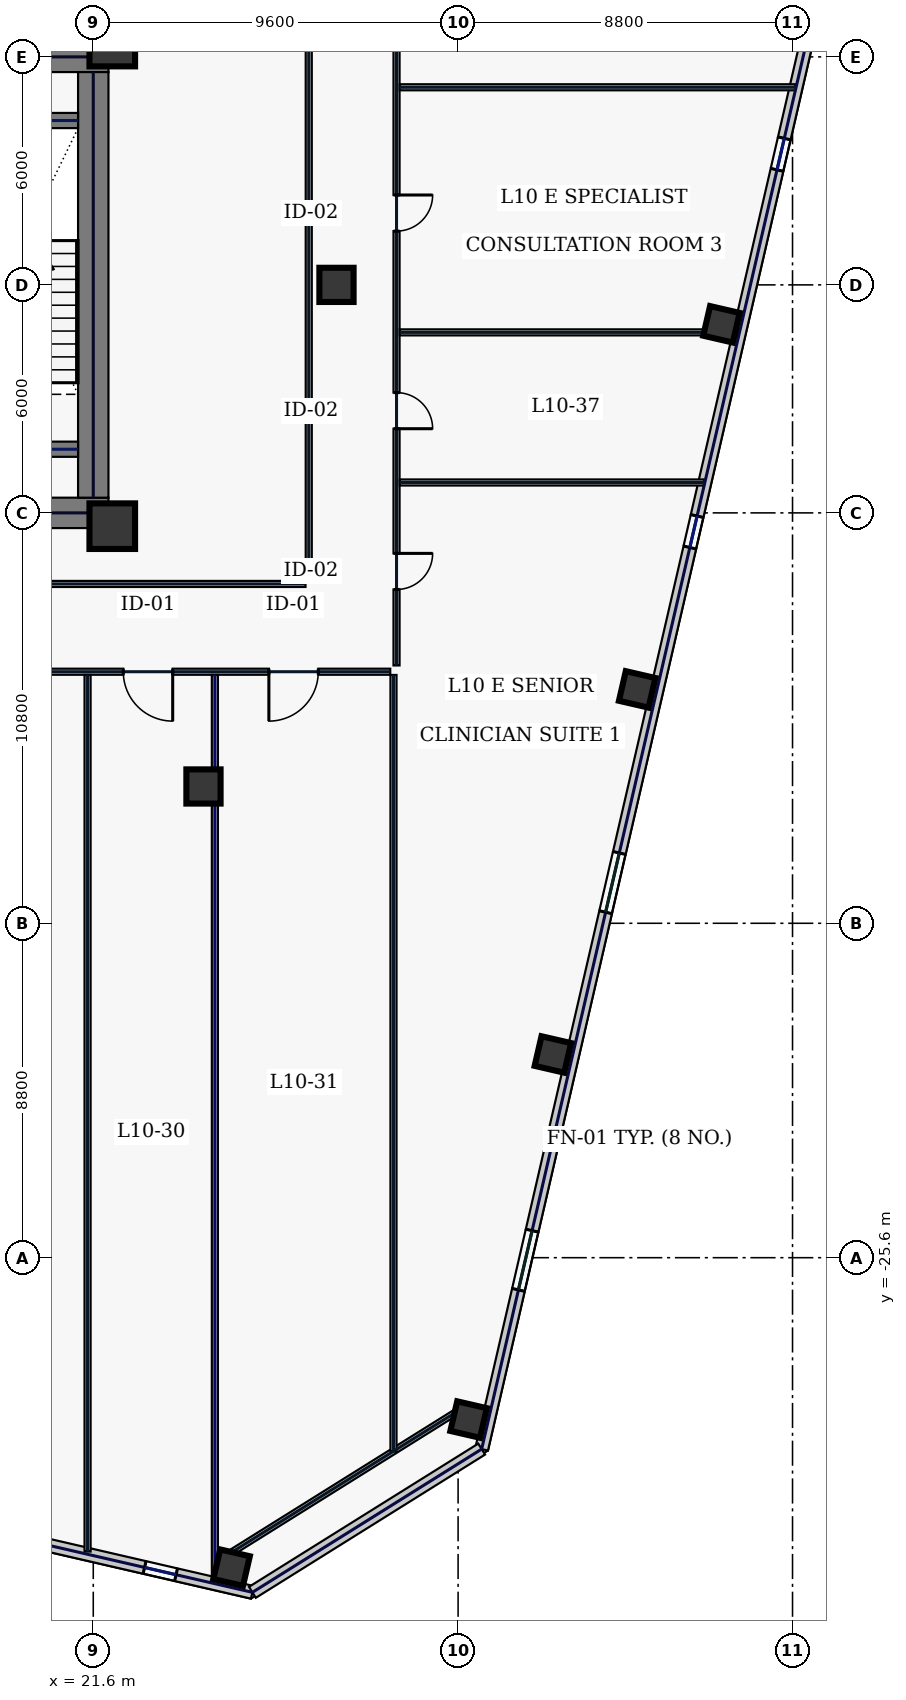
"""IFC4 building model, lengths in metres.
Left out: names, types, materials, properties, quantities, classifications, styles, units other than length and angle.
Written with IfcOpenShell. Run it as: python <this file> out.ifc"""

import sys

from ifc_helpers import new_model, si_unit, direction, frame, frame_2d, origin, origin_2d, place, context, subcontext, project, spatial, rectangle, hollow_rectangle, extrude, element, fill, save


model = new_model("IFC4")
c1 = context("Model", 3, precision=1e-05, world=origin(), true_north=direction((0.0, 1.0)))
c2 = subcontext(c1, "Body", "Model", "MODEL_VIEW")
j1 = project(units=[si_unit("LENGTHUNIT", "METRE"), si_unit("PLANEANGLEUNIT", "RADIAN")], contexts=[c1])
p1 = place(None, origin())
s1 = spatial("IfcSite", under=j1, at=p1, CompositionType="ELEMENT")
p2 = place(p1, origin())
s2 = spatial("IfcBuilding", under=s1, at=p2, CompositionType="ELEMENT")
p3 = place(p2, frame((0.0, 0.0, 51.4)))
s3 = spatial("IfcBuildingStorey", under=s2, at=p3, CompositionType="ELEMENT", Elevation=51.4)
for number, where, z_axis, x_axis in (
    (1, (10.4, 6.0, 0.0), (0.0, 0.0, 1.0), (1.0, 0.0, 0.0)),
    (2, (10.4, -6.0, 0.0), (0.0, 0.0, 1.0), (1.0, 0.0, 0.0)),
):
    element("IfcWall", number, at=place(p3, frame(where, z_axis=z_axis, x_axis=x_axis)), inside=s3, PredefinedType="SHEAR", context=c2, shape_type="SweptSolid", body=[
        extrude(rectangle(XDim=11.6, YDim=0.8, at=frame_2d((5.8, 0.0))), origin(), (0.0, 0.0, 1.0), 3.74),
    ])
p4 = place(p3, frame((21.6, -5.6, 0.0), z_axis=(0.0, 0.0, 1.0), x_axis=(0.0, 1.0, 0.0)))
e3 = element("IfcWall", 3, at=p4, inside=s3, PredefinedType="SHEAR", context=c2, shape_type="SweptSolid", body=[
    extrude(rectangle(XDim=11.2, YDim=0.8, at=frame_2d((5.6, 0.0))), origin(), (0.0, 0.0, 1.0), 3.74),
])
for number, where, z_axis, x_axis in (
    (4, (17.8, -4.325, 0.0), (0.0, 0.0, 1.0), (1.0, 0.0, 0.0)),
    (5, (17.8, 4.325, 0.0), (0.0, 0.0, 1.0), (1.0, 0.0, 0.0)),
):
    element("IfcWall", number, at=place(p3, frame(where, z_axis=z_axis, x_axis=x_axis)), inside=s3, PredefinedType="SHEAR", context=c2, shape_type="SweptSolid", body=[
        extrude(rectangle(XDim=3.4, YDim=0.4, at=frame_2d((1.7, 0.0))), origin(), (0.0, 0.0, 1.0), 3.74),
    ])
for number, where, z_axis, x_axis in (
    (6, (22.1, -6.35, 0.0), (0.0, 0.0, 1.0), (1.0, 0.0, 0.0)),
    (7, (22.1, 6.35, 0.0), (0.0, 0.0, 1.0), (1.0, 0.0, 0.0)),
):
    element("IfcColumn", number, at=place(p3, frame(where, z_axis=z_axis, x_axis=x_axis)), inside=s3, PredefinedType="COLUMN", context=c2, shape_type="SweptSolid", body=[
        extrude(hollow_rectangle(XDim=1.2, YDim=1.2, WallThickness=0.05, at=origin_2d()), origin(), (0.0, 0.0, 1.0), 3.74),
    ])
for number, where, z_axis, x_axis in (
    (8, (24.5, -13.2, 0.0), (0.0, 0.0, 1.0), (1.0, 0.0, 0.0)),
    (9, (28.0, 0.0, 0.0), (0.0, 0.0, 1.0), (1.0, 0.0, 0.0)),
):
    element("IfcColumn", number, at=place(p3, frame(where, z_axis=z_axis, x_axis=x_axis)), inside=s3, PredefinedType="COLUMN", context=c2, shape_type="SweptSolid", body=[
        extrude(hollow_rectangle(XDim=0.9, YDim=0.9, WallThickness=0.04, at=origin_2d()), origin(), (0.0, 0.0, 1.0), 3.74),
    ])
for number, where, z_axis, x_axis in (
    (10, (25.24, -33.757, 0.0), (0.0, 0.0, 1.0), (0.974, -0.225, 0.0)),
    (11, (31.476, -29.86, 0.0), (0.0, 0.0, 1.0), (0.974, -0.225, 0.0)),
    (12, (33.694, -20.252, 0.0), (0.0, 0.0, 1.0), (0.974, -0.225, 0.0)),
    (13, (35.912, -10.645, 0.0), (0.0, 0.0, 1.0), (0.974, -0.225, 0.0)),
    (14, (38.13, -1.038, 0.0), (0.0, 0.0, 1.0), (0.974, -0.225, 0.0)),
):
    element("IfcColumn", number, at=place(p3, frame(where, z_axis=z_axis, x_axis=x_axis)), inside=s3, PredefinedType="COLUMN", context=c2, shape_type="SweptSolid", body=[
        extrude(hollow_rectangle(XDim=0.8, YDim=0.8, WallThickness=0.036, at=origin_2d()), origin(), (0.0, 0.0, 1.0), 3.74),
    ])
p5 = place(p3, frame((3.717, -29.311, 0.0), z_axis=(0.0, 0.0, 1.0), x_axis=(0.97436993772, -0.224951604723, 0.0)))
e15 = element("IfcWall", 15, at=p5, inside=s3, PredefinedType="STANDARD", context=c2, shape_type="SweptSolid", body=[
    extrude(rectangle(XDim=22.651, YDim=0.34, at=frame_2d((11.326, 0.0))), origin(), (0.0, 0.0, 1.0), 3.74),
])
p6 = place(p5, frame((3.856, 0.0, 0.72)))
e16 = element("IfcOpeningElement", 16, at=p6, cuts=e15, PredefinedType="OPENING", context=c2, shape_type="SweptSolid", body=[
    extrude(rectangle(XDim=2.5, YDim=2.15, at=frame_2d((1.25, 1.075))), frame((0.0, 0.18, 0.0), z_axis=(0.0, -1.0, 0.0), x_axis=(1.0, 0.0, 0.0)), (0.0, 0.0, 1.0), 0.36),
])
p7 = place(p5, frame((9.991, 0.0, 0.72)))
e17 = element("IfcOpeningElement", 17, at=p7, cuts=e15, PredefinedType="OPENING", context=c2, shape_type="SweptSolid", body=[
    extrude(rectangle(XDim=0.85, YDim=1.85, at=frame_2d((0.425, 0.925))), frame((0.0, 0.18, 0.0), z_axis=(0.0, -1.0, 0.0), x_axis=(1.0, 0.0, 0.0)), (0.0, 0.0, 1.0), 0.36),
])
p8 = place(p5, frame((15.255, 0.0, 0.72)))
e18 = element("IfcOpeningElement", 18, at=p8, cuts=e15, PredefinedType="OPENING", context=c2, shape_type="SweptSolid", body=[
    extrude(rectangle(XDim=0.85, YDim=1.85, at=frame_2d((0.425, 0.925))), frame((0.0, 0.18, 0.0), z_axis=(0.0, -1.0, 0.0), x_axis=(1.0, 0.0, 0.0)), (0.0, 0.0, 1.0), 0.36),
])
p9 = place(p5, frame((19.739, 0.0, 0.72)))
e19 = element("IfcOpeningElement", 19, at=p9, cuts=e15, PredefinedType="OPENING", context=c2, shape_type="SweptSolid", body=[
    extrude(rectangle(XDim=0.85, YDim=1.85, at=frame_2d((0.425, 0.925))), frame((0.0, 0.18, 0.0), z_axis=(0.0, -1.0, 0.0), x_axis=(1.0, 0.0, 0.0)), (0.0, 0.0, 1.0), 0.36),
])
p10 = place(p3, frame((31.82, -30.637, 0.0), z_axis=(0.0, 0.0, 1.0), x_axis=(0.224949969076, 0.974370315338, 0.0)))
e20 = element("IfcWall", 20, at=p10, inside=s3, PredefinedType="STANDARD", context=c2, shape_type="SweptSolid", body=[
    extrude(rectangle(XDim=40.8, YDim=0.34, at=frame_2d((20.4, 0.0))), origin(), (0.0, 0.0, 1.0), 3.74),
])
p11 = place(p10, frame((4.3, 0.0, 0.58)))
e21 = element("IfcOpeningElement", 21, at=p11, cuts=e20, PredefinedType="OPENING", context=c2, shape_type="SweptSolid", body=[
    extrude(rectangle(XDim=1.6, YDim=2.3, at=frame_2d((0.8, 1.15))), frame((0.0, 0.18, 0.0), z_axis=(0.0, -1.0, 0.0), x_axis=(1.0, 0.0, 0.0)), (0.0, 0.0, 1.0), 0.36),
])
p12 = place(p10, frame((14.5, 0.0, 0.58)))
e22 = element("IfcOpeningElement", 22, at=p12, cuts=e20, PredefinedType="OPENING", context=c2, shape_type="SweptSolid", body=[
    extrude(rectangle(XDim=1.6, YDim=2.3, at=frame_2d((0.8, 1.15))), frame((0.0, 0.18, 0.0), z_axis=(0.0, -1.0, 0.0), x_axis=(1.0, 0.0, 0.0)), (0.0, 0.0, 1.0), 0.36),
])
p13 = place(p10, frame((24.35, 0.0, 0.75)))
e23 = element("IfcOpeningElement", 23, at=p13, cuts=e20, PredefinedType="OPENING", context=c2, shape_type="SweptSolid", body=[
    extrude(rectangle(XDim=0.85, YDim=1.85, at=frame_2d((0.425, 0.925))), frame((0.0, 0.18, 0.0), z_axis=(0.0, -1.0, 0.0), x_axis=(1.0, 0.0, 0.0)), (0.0, 0.0, 1.0), 0.36),
])
p14 = place(p10, frame((34.55, 0.0, 0.75)))
e24 = element("IfcOpeningElement", 24, at=p14, cuts=e20, PredefinedType="OPENING", context=c2, shape_type="SweptSolid", body=[
    extrude(rectangle(XDim=0.85, YDim=1.85, at=frame_2d((0.425, 0.925))), frame((0.0, 0.18, 0.0), z_axis=(0.0, -1.0, 0.0), x_axis=(1.0, 0.0, 0.0)), (0.0, 0.0, 1.0), 0.36),
])
p15 = place(p3, frame((25.788, -34.406, 0.0), z_axis=(0.0, 0.0, 1.0), x_axis=(0.848046504656, 0.529921811158, 0.0)))
e25 = element("IfcWall", 25, at=p15, inside=s3, PredefinedType="STANDARD", context=c2, shape_type="SweptSolid", body=[
    extrude(rectangle(XDim=7.113, YDim=0.34, at=frame_2d((3.557, 0.0))), origin(), (0.0, 0.0, 1.0), 3.74),
])
p16 = place(p3, frame((25.06, -33.468, 0.0), z_axis=(0.0, 0.0, 1.0), x_axis=(0.848043064089, 0.529927317139, 0.0)))
e26 = element("IfcWall", 26, at=p16, inside=s3, PredefinedType="PARTITIONING", context=c2, shape_type="SweptSolid", body=[
    extrude(rectangle(XDim=7.354, YDim=0.16, at=frame_2d((3.677, 0.0))), origin(), (0.0, 0.0, 1.0), 3.74),
])
p17 = place(p3, frame((29.58, 10.115, 0.0), z_axis=(0.0, 0.0, 1.0), x_axis=(0.0, -1.0, 0.0)))
e27 = element("IfcWall", 27, at=p17, inside=s3, PredefinedType="PARTITIONING", context=c2, shape_type="SweptSolid", body=[
    extrude(rectangle(XDim=20.13, YDim=0.16, at=frame_2d((10.065, 0.0))), origin(), (0.0, 0.0, 1.0), 3.74),
])
p18 = place(p17, frame((17.181, 0.0, 0.0)))
e28 = element("IfcOpeningElement", 28, at=p18, cuts=e27, PredefinedType="OPENING", context=c2, shape_type="SweptSolid", body=[
    extrude(rectangle(XDim=0.95, YDim=2.2, at=frame_2d((0.475, 1.1))), frame((0.0, 0.09, 0.0), z_axis=(0.0, -1.0, 0.0), x_axis=(1.0, 0.0, 0.0)), (0.0, 0.0, 1.0), 0.18),
])
p19 = place(p17, frame((12.95, 0.0, 0.0)))
e29 = element("IfcOpeningElement", 29, at=p19, cuts=e27, PredefinedType="OPENING", context=c2, shape_type="SweptSolid", body=[
    extrude(rectangle(XDim=0.95, YDim=2.2, at=frame_2d((0.475, 1.1))), frame((0.0, 0.09, 0.0), z_axis=(0.0, -1.0, 0.0), x_axis=(1.0, 0.0, 0.0)), (0.0, 0.0, 1.0), 0.18),
])
p20 = place(p17, frame((7.75, 0.0, 0.0)))
e30 = element("IfcOpeningElement", 30, at=p20, cuts=e27, PredefinedType="OPENING", context=c2, shape_type="SweptSolid", body=[
    extrude(rectangle(XDim=0.95, YDim=2.2, at=frame_2d((0.475, 1.1))), frame((0.0, 0.09, 0.0), z_axis=(0.0, -1.0, 0.0), x_axis=(1.0, 0.0, 0.0)), (0.0, 0.0, 1.0), 0.18),
])
p21 = place(p17, frame((2.219, 0.0, 0.0)))
e31 = element("IfcOpeningElement", 31, at=p21, cuts=e27, PredefinedType="OPENING", context=c2, shape_type="SweptSolid", body=[
    extrude(rectangle(XDim=0.95, YDim=2.2, at=frame_2d((0.475, 1.1))), frame((0.0, 0.09, 0.0), z_axis=(0.0, -1.0, 0.0), x_axis=(1.0, 0.0, 0.0)), (0.0, 0.0, 1.0), 0.18),
])
p22 = place(p3, frame((29.415, -10.18, 0.0), z_axis=(0.0, 0.0, 1.0), x_axis=(-1.0, 0.0, 0.0)))
e32 = element("IfcWall", 32, at=p22, inside=s3, PredefinedType="PARTITIONING", context=c2, shape_type="SweptSolid", body=[
    extrude(rectangle(XDim=58.83, YDim=0.16, at=frame_2d((29.415, 0.0))), origin(), (0.0, 0.0, 1.0), 3.74),
])
p23 = place(p22, frame((56.006, 0.0, 0.0)))
e33 = element("IfcOpeningElement", 33, at=p23, cuts=e32, PredefinedType="OPENING", context=c2, shape_type="SweptSolid", body=[
    extrude(rectangle(XDim=1.05, YDim=2.2, at=frame_2d((0.525, 1.1))), frame((0.0, 0.09, 0.0), z_axis=(0.0, -1.0, 0.0), x_axis=(1.0, 0.0, 0.0)), (0.0, 0.0, 1.0), 0.18),
])
p24 = place(p22, frame((50.719, 0.0, 0.0)))
e34 = element("IfcOpeningElement", 34, at=p24, cuts=e32, PredefinedType="OPENING", context=c2, shape_type="SweptSolid", body=[
    extrude(rectangle(XDim=1.3, YDim=2.2, at=frame_2d((0.65, 1.1))), frame((0.0, 0.09, 0.0), z_axis=(0.0, -1.0, 0.0), x_axis=(1.0, 0.0, 0.0)), (0.0, 0.0, 1.0), 0.18),
])
p25 = place(p22, frame((45.208, 0.0, 0.0)))
e35 = element("IfcOpeningElement", 35, at=p25, cuts=e32, PredefinedType="OPENING", context=c2, shape_type="SweptSolid", body=[
    extrude(rectangle(XDim=1.3, YDim=2.2, at=frame_2d((0.65, 1.1))), frame((0.0, 0.09, 0.0), z_axis=(0.0, -1.0, 0.0), x_axis=(1.0, 0.0, 0.0)), (0.0, 0.0, 1.0), 0.18),
])
p26 = place(p22, frame((38.239, 0.0, 0.0)))
e36 = element("IfcOpeningElement", 36, at=p26, cuts=e32, PredefinedType="OPENING", context=c2, shape_type="SweptSolid", body=[
    extrude(rectangle(XDim=0.95, YDim=2.2, at=frame_2d((0.475, 1.1))), frame((0.0, 0.09, 0.0), z_axis=(0.0, -1.0, 0.0), x_axis=(1.0, 0.0, 0.0)), (0.0, 0.0, 1.0), 0.18),
])
p27 = place(p22, frame((30.55, 0.0, 0.0)))
e37 = element("IfcOpeningElement", 37, at=p27, cuts=e32, PredefinedType="OPENING", context=c2, shape_type="SweptSolid", body=[
    extrude(rectangle(XDim=0.95, YDim=2.2, at=frame_2d((0.475, 1.1))), frame((0.0, 0.09, 0.0), z_axis=(0.0, -1.0, 0.0), x_axis=(1.0, 0.0, 0.0)), (0.0, 0.0, 1.0), 0.18),
])
p28 = place(p22, frame((24.85, 0.0, 0.0)))
e38 = element("IfcOpeningElement", 38, at=p28, cuts=e32, PredefinedType="OPENING", context=c2, shape_type="SweptSolid", body=[
    extrude(rectangle(XDim=1.05, YDim=2.2, at=frame_2d((0.525, 1.1))), frame((0.0, 0.09, 0.0), z_axis=(0.0, -1.0, 0.0), x_axis=(1.0, 0.0, 0.0)), (0.0, 0.0, 1.0), 0.18),
])
p29 = place(p22, frame((19.4, 0.0, 0.0)))
e39 = element("IfcOpeningElement", 39, at=p29, cuts=e32, PredefinedType="OPENING", context=c2, shape_type="SweptSolid", body=[
    extrude(rectangle(XDim=0.95, YDim=2.2, at=frame_2d((0.475, 1.1))), frame((0.0, 0.09, 0.0), z_axis=(0.0, -1.0, 0.0), x_axis=(1.0, 0.0, 0.0)), (0.0, 0.0, 1.0), 0.18),
])
p30 = place(p22, frame((14.2, 0.0, 0.0)))
e40 = element("IfcOpeningElement", 40, at=p30, cuts=e32, PredefinedType="OPENING", context=c2, shape_type="SweptSolid", body=[
    extrude(rectangle(XDim=0.95, YDim=2.2, at=frame_2d((0.475, 1.1))), frame((0.0, 0.09, 0.0), z_axis=(0.0, -1.0, 0.0), x_axis=(1.0, 0.0, 0.0)), (0.0, 0.0, 1.0), 0.18),
])
p31 = place(p22, frame((9.7, 0.0, 0.0)))
e41 = element("IfcOpeningElement", 41, at=p31, cuts=e32, PredefinedType="OPENING", context=c2, shape_type="SweptSolid", body=[
    extrude(rectangle(XDim=0.95, YDim=2.2, at=frame_2d((0.475, 1.1))), frame((0.0, 0.09, 0.0), z_axis=(0.0, -1.0, 0.0), x_axis=(1.0, 0.0, 0.0)), (0.0, 0.0, 1.0), 0.18),
])
p32 = place(p22, frame((5.725, 0.0, 0.0)))
e42 = element("IfcOpeningElement", 42, at=p32, cuts=e32, PredefinedType="OPENING", context=c2, shape_type="SweptSolid", body=[
    extrude(rectangle(XDim=1.3, YDim=2.2, at=frame_2d((0.65, 1.1))), frame((0.0, 0.09, 0.0), z_axis=(0.0, -1.0, 0.0), x_axis=(1.0, 0.0, 0.0)), (0.0, 0.0, 1.0), 0.18),
])
p33 = place(p22, frame((1.894, 0.0, 0.0)))
e43 = element("IfcOpeningElement", 43, at=p33, cuts=e32, PredefinedType="OPENING", context=c2, shape_type="SweptSolid", body=[
    extrude(rectangle(XDim=1.3, YDim=2.2, at=frame_2d((0.65, 1.1))), frame((0.0, 0.09, 0.0), z_axis=(0.0, -1.0, 0.0), x_axis=(1.0, 0.0, 0.0)), (0.0, 0.0, 1.0), 0.18),
])
p34 = place(p3, frame((10.665, -7.87, 0.0), z_axis=(0.0, 0.0, 1.0), x_axis=(1.0, 0.0, 0.0)))
e44 = element("IfcWall", 44, at=p34, inside=s3, PredefinedType="PARTITIONING", context=c2, shape_type="SweptSolid", body=[
    extrude(rectangle(XDim=16.52, YDim=0.16, at=frame_2d((8.26, 0.0))), origin(), (0.0, 0.0, 1.0), 3.74),
])
p35 = place(p3, frame((27.27, -7.785, 0.0), z_axis=(0.0, 0.0, 1.0), x_axis=(0.0, 1.0, 0.0)))
e45 = element("IfcWall", 45, at=p35, inside=s3, PredefinedType="PARTITIONING", context=c2, shape_type="SweptSolid", body=[
    extrude(rectangle(XDim=15.67, YDim=0.16, at=frame_2d((7.835, 0.0))), origin(), (0.0, 0.0, 1.0), 3.74),
])
p36 = place(p3, frame((29.5, -30.703, 0.0), z_axis=(0.0, 0.0, 1.0), x_axis=(0.0, 1.0, 0.0)))
e46 = element("IfcWall", 46, at=p36, inside=s3, PredefinedType="PARTITIONING", context=c2, shape_type="SweptSolid", body=[
    extrude(rectangle(XDim=20.438, YDim=0.16, at=frame_2d((10.219, 0.0))), origin(), (0.0, 0.0, 1.0), 3.74),
])
p37 = place(p3, frame((24.8, -34.107, 0.0), z_axis=(0.0, 0.0, 1.0), x_axis=(0.0, 1.0, 0.0)))
e47 = element("IfcWall", 47, at=p37, inside=s3, PredefinedType="PARTITIONING", context=c2, shape_type="SweptSolid", body=[
    extrude(rectangle(XDim=23.842, YDim=0.16, at=frame_2d((11.921, 0.0))), origin(), (0.0, 0.0, 1.0), 3.235),
])
p38 = place(p3, frame((21.45, -33.333, 0.0), z_axis=(0.0, 0.0, 1.0), x_axis=(0.0, 1.0, 0.0)))
e48 = element("IfcWall", 48, at=p38, inside=s3, PredefinedType="PARTITIONING", context=c2, shape_type="SweptSolid", body=[
    extrude(rectangle(XDim=23.068, YDim=0.16, at=frame_2d((11.534, 0.0))), origin(), (0.0, 0.0, 1.0), 3.74),
])
p39 = place(p3, frame((29.665, -5.2, 0.0), z_axis=(0.0, 0.0, 1.0), x_axis=(1.0, 0.0, 0.0)))
e49 = element("IfcWall", 49, at=p39, inside=s3, PredefinedType="PARTITIONING", context=c2, shape_type="SweptSolid", body=[
    extrude(rectangle(XDim=8.007, YDim=0.16, at=frame_2d((4.003, 0.0))), origin(), (0.0, 0.0, 1.0), 3.74),
])
p40 = place(p3, frame((29.665, -1.25, 0.0), z_axis=(0.0, 0.0, 1.0), x_axis=(1.0, 0.0, 0.0)))
e50 = element("IfcWall", 50, at=p40, inside=s3, PredefinedType="PARTITIONING", context=c2, shape_type="SweptSolid", body=[
    extrude(rectangle(XDim=8.919, YDim=0.16, at=frame_2d((4.459, 0.0))), origin(), (0.0, 0.0, 1.0), 3.74),
])
p41 = place(p3, frame((29.665, 5.2, 0.0), z_axis=(0.0, 0.0, 1.0), x_axis=(1.0, 0.0, 0.0)))
e51 = element("IfcWall", 51, at=p41, inside=s3, PredefinedType="PARTITIONING", context=c2, shape_type="SweptSolid", body=[
    extrude(rectangle(XDim=10.408, YDim=0.16, at=frame_2d((5.204, 0.0))), origin(), (0.0, 0.0, 1.0), 3.74),
])
p42 = place(p9, origin())
e52 = element("IfcWindow", 52, at=p42, inside=s3, PartitioningType="SINGLE_PANEL", PredefinedType="WINDOW", context=c2, shape_type="SweptSolid", body=[
    extrude(rectangle(XDim=0.85, YDim=1.85, at=frame_2d((0.425, 0.925))), frame((0.0, 0.03, 0.0), z_axis=(0.0, -1.0, 0.0), x_axis=(1.0, 0.0, 0.0)), (0.0, 0.0, 1.0), 0.06),
])
fill(e19, e52)
p43 = place(p11, origin())
e53 = element("IfcWindow", 53, at=p43, inside=s3, PartitioningType="SINGLE_PANEL", PredefinedType="WINDOW", context=c2, shape_type="SweptSolid", body=[
    extrude(rectangle(XDim=1.6, YDim=2.3, at=frame_2d((0.8, 1.15))), frame((0.0, 0.03, 0.0), z_axis=(0.0, -1.0, 0.0), x_axis=(1.0, 0.0, 0.0)), (0.0, 0.0, 1.0), 0.06),
])
fill(e21, e53)
p44 = place(p12, origin())
e54 = element("IfcWindow", 54, at=p44, inside=s3, PartitioningType="SINGLE_PANEL", PredefinedType="WINDOW", context=c2, shape_type="SweptSolid", body=[
    extrude(rectangle(XDim=1.6, YDim=2.3, at=frame_2d((0.8, 1.15))), frame((0.0, 0.03, 0.0), z_axis=(0.0, -1.0, 0.0), x_axis=(1.0, 0.0, 0.0)), (0.0, 0.0, 1.0), 0.06),
])
fill(e22, e54)
p45 = place(p13, origin())
e55 = element("IfcWindow", 55, at=p45, inside=s3, PartitioningType="SINGLE_PANEL", PredefinedType="WINDOW", context=c2, shape_type="SweptSolid", body=[
    extrude(rectangle(XDim=0.85, YDim=1.85, at=frame_2d((0.425, 0.925))), frame((0.0, 0.03, 0.0), z_axis=(0.0, -1.0, 0.0), x_axis=(1.0, 0.0, 0.0)), (0.0, 0.0, 1.0), 0.06),
])
fill(e23, e55)
p46 = place(p14, origin())
e56 = element("IfcWindow", 56, at=p46, inside=s3, PartitioningType="SINGLE_PANEL", PredefinedType="WINDOW", context=c2, shape_type="SweptSolid", body=[
    extrude(rectangle(XDim=0.85, YDim=1.85, at=frame_2d((0.425, 0.925))), frame((0.0, 0.03, 0.0), z_axis=(0.0, -1.0, 0.0), x_axis=(1.0, 0.0, 0.0)), (0.0, 0.0, 1.0), 0.06),
])
fill(e24, e56)
p47 = place(p32, origin())
e57 = element("IfcDoor", 57, at=p47, inside=s3, OperationType="SINGLE_SWING_LEFT", PredefinedType="DOOR", context=c2, shape_type="SweptSolid", body=[
    extrude(rectangle(XDim=1.3, YDim=2.2, at=frame_2d((0.65, 1.1))), frame((0.0, 0.025, 0.0), z_axis=(0.0, -1.0, 0.0), x_axis=(1.0, 0.0, 0.0)), (0.0, 0.0, 1.0), 0.05),
])
fill(e42, e57)
p48 = place(p33, origin())
e58 = element("IfcDoor", 58, at=p48, inside=s3, OperationType="SINGLE_SWING_RIGHT", PredefinedType="DOOR", context=c2, shape_type="SweptSolid", body=[
    extrude(rectangle(XDim=1.3, YDim=2.2, at=frame_2d((0.65, 1.1))), frame((0.0, 0.025, 0.0), z_axis=(0.0, -1.0, 0.0), x_axis=(1.0, 0.0, 0.0)), (0.0, 0.0, 1.0), 0.05),
])
fill(e43, e58)
p49 = place(p18, origin())
e59 = element("IfcDoor", 59, at=p49, inside=s3, OperationType="SINGLE_SWING_LEFT", PredefinedType="DOOR", context=c2, shape_type="SweptSolid", body=[
    extrude(rectangle(XDim=0.95, YDim=2.2, at=frame_2d((0.475, 1.1))), frame((0.0, 0.025, 0.0), z_axis=(0.0, -1.0, 0.0), x_axis=(1.0, 0.0, 0.0)), (0.0, 0.0, 1.0), 0.05),
])
fill(e28, e59)
p50 = place(p19, origin())
e60 = element("IfcDoor", 60, at=p50, inside=s3, OperationType="SINGLE_SWING_RIGHT", PredefinedType="DOOR", context=c2, shape_type="SweptSolid", body=[
    extrude(rectangle(XDim=0.95, YDim=2.2, at=frame_2d((0.475, 1.1))), frame((0.0, 0.025, 0.0), z_axis=(0.0, -1.0, 0.0), x_axis=(1.0, 0.0, 0.0)), (0.0, 0.0, 1.0), 0.05),
])
fill(e29, e60)
p51 = place(p20, origin())
e61 = element("IfcDoor", 61, at=p51, inside=s3, OperationType="SINGLE_SWING_LEFT", PredefinedType="DOOR", context=c2, shape_type="SweptSolid", body=[
    extrude(rectangle(XDim=0.95, YDim=2.2, at=frame_2d((0.475, 1.1))), frame((0.0, 0.025, 0.0), z_axis=(0.0, -1.0, 0.0), x_axis=(1.0, 0.0, 0.0)), (0.0, 0.0, 1.0), 0.05),
])
fill(e30, e61)
save(model, sys.argv[1])
